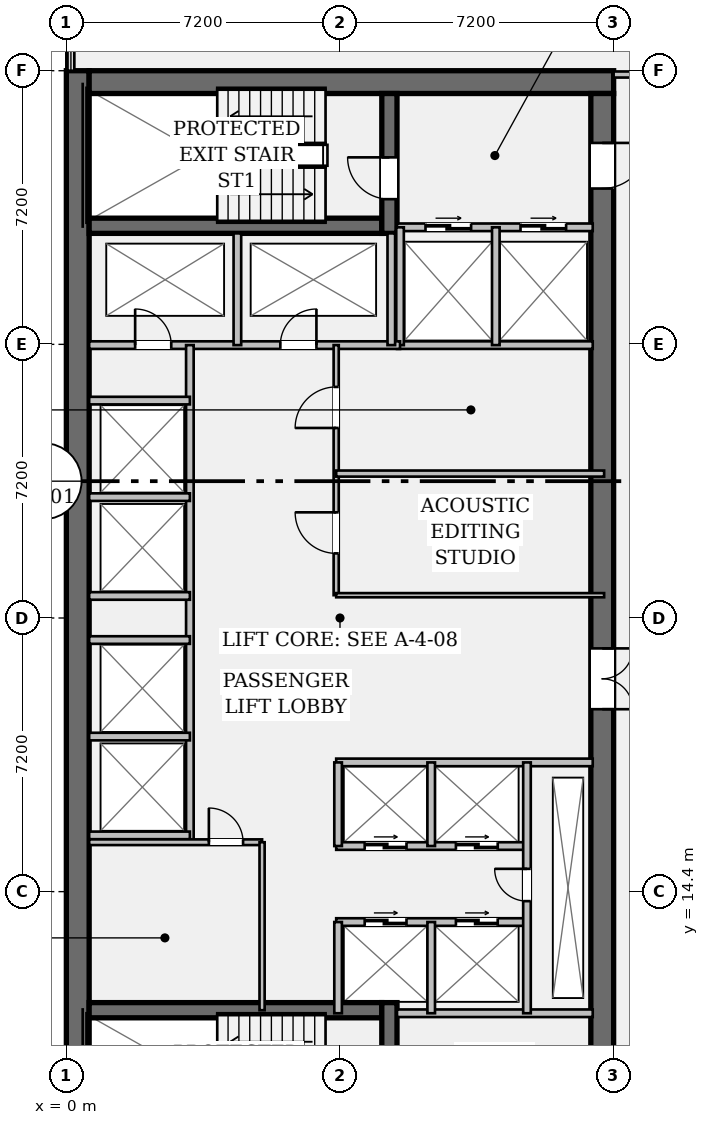
"""IFC4 building model, lengths in metres.
Left out: names, types, materials, properties, quantities, classifications, styles, units other than length and angle.
Written with IfcOpenShell. Run it as: python <this file> out.ifc"""

import sys

from ifc_helpers import new_model, si_unit, direction, frame, frame_2d, origin, place, context, subcontext, project, spatial, rectangle, extrude, element, fill, save


model = new_model("IFC4")
c1 = context("Model", 3, precision=1e-05, world=origin(), true_north=direction((0.0, 1.0)))
c2 = subcontext(c1, "Body", "Model", "MODEL_VIEW")
j1 = project(units=[si_unit("LENGTHUNIT", "METRE"), si_unit("PLANEANGLEUNIT", "RADIAN")], contexts=[c1])
p1 = place(None, origin())
s1 = spatial("IfcSite", under=j1, at=p1, CompositionType="ELEMENT")
p2 = place(p1, origin())
s2 = spatial("IfcBuilding", under=s1, at=p2, CompositionType="ELEMENT")
p3 = place(p2, frame((0.0, 0.0, 117.6)))
s3 = spatial("IfcBuildingStorey", under=s2, at=p3, CompositionType="ELEMENT", Elevation=117.6)
p4 = place(p3, frame((0.3, 7.2, 0.0), z_axis=(0.0, 0.0, 1.0), x_axis=(0.0, 1.0, 0.0)))
e1 = element("IfcWall", 1, at=p4, inside=s3, PredefinedType="SHEAR", context=c2, shape_type="SweptSolid", body=[
    extrude(rectangle(XDim=28.8, YDim=0.6, at=frame_2d((14.4, 0.0))), origin(), (0.0, 0.0, 1.0), 3.58),
])
p5 = place(p3, frame((0.6, 35.7, 0.0), z_axis=(0.0, 0.0, 1.0), x_axis=(1.0, 0.0, 0.0)))
e2 = element("IfcWall", 2, at=p5, inside=s3, PredefinedType="SHEAR", context=c2, shape_type="SweptSolid", body=[
    extrude(rectangle(XDim=13.8, YDim=0.6, at=frame_2d((6.9, 0.0))), origin(), (0.0, 0.0, 1.0), 3.58),
])
p6 = place(p3, frame((14.1, 35.4, 0.0), z_axis=(0.0, 0.0, 1.0), x_axis=(0.0, -1.0, 0.0)))
e3 = element("IfcWall", 3, at=p6, inside=s3, PredefinedType="SHEAR", context=c2, shape_type="SweptSolid", body=[
    extrude(rectangle(XDim=27.6, YDim=0.6, at=frame_2d((13.8, 0.0))), origin(), (0.0, 0.0, 1.0), 3.58),
])
p7 = place(p6, frame((1.3, 0.0, 0.0)))
e4 = element("IfcOpeningElement", 4, at=p7, cuts=e3, PredefinedType="OPENING", context=c2, shape_type="SweptSolid", body=[
    extrude(rectangle(XDim=1.2, YDim=2.15, at=frame_2d((0.6, 1.075))), frame((0.0, 0.312, 0.0), z_axis=(0.0, -1.0, 0.0), x_axis=(1.0, 0.0, 0.0)), (0.0, 0.0, 1.0), 0.624),
])
p8 = place(p6, frame((25.25, 0.0, 0.0)))
e5 = element("IfcOpeningElement", 5, at=p8, cuts=e3, PredefinedType="OPENING", context=c2, shape_type="SweptSolid", body=[
    extrude(rectangle(XDim=1.2, YDim=2.15, at=frame_2d((0.6, 1.075))), frame((0.0, 0.312, 0.0), z_axis=(0.0, -1.0, 0.0), x_axis=(1.0, 0.0, 0.0)), (0.0, 0.0, 1.0), 0.624),
])
p9 = place(p6, frame((14.6, 0.0, 0.0)))
e6 = element("IfcOpeningElement", 6, at=p9, cuts=e3, PredefinedType="OPENING", context=c2, shape_type="SweptSolid", body=[
    extrude(rectangle(XDim=1.6, YDim=2.2, at=frame_2d((0.8, 1.1))), frame((0.0, 0.312, 0.0), z_axis=(0.0, -1.0, 0.0), x_axis=(1.0, 0.0, 0.0)), (0.0, 0.0, 1.0), 0.624),
])
for number, where, z_axis, x_axis in (
    (7, (0.6, 31.92, 0.0), (0.0, 0.0, 1.0), (1.0, 0.0, 0.0)),
    (8, (0.6, 11.28, 0.0), (0.0, 0.0, 1.0), (1.0, 0.0, 0.0)),
):
    element("IfcWall", number, at=place(p3, frame(where, z_axis=z_axis, x_axis=x_axis)), inside=s3, PredefinedType="SHEAR", context=c2, shape_type="SweptSolid", body=[
        extrude(rectangle(XDim=7.7, YDim=0.4, at=frame_2d((3.85, 0.0))), origin(), (0.0, 0.0, 1.0), 3.58),
    ])
p10 = place(p3, frame((8.5, 31.72, 0.0), z_axis=(0.0, 0.0, 1.0), x_axis=(0.0, 1.0, 0.0)))
e9 = element("IfcWall", 9, at=p10, inside=s3, PredefinedType="SHEAR", context=c2, shape_type="SweptSolid", body=[
    extrude(rectangle(XDim=3.68, YDim=0.4, at=frame_2d((1.84, 0.0))), origin(), (0.0, 0.0, 1.0), 3.58),
])
p11 = place(p10, frame((0.9, 0.0, 0.0)))
e10 = element("IfcOpeningElement", 10, at=p11, cuts=e9, PredefinedType="OPENING", context=c2, shape_type="SweptSolid", body=[
    extrude(rectangle(XDim=1.1, YDim=2.15, at=frame_2d((0.55, 1.075))), frame((0.0, 0.212, 0.0), z_axis=(0.0, -1.0, 0.0), x_axis=(1.0, 0.0, 0.0)), (0.0, 0.0, 1.0), 0.424),
])
p12 = place(p3, frame((8.5, 7.8, 0.0), z_axis=(0.0, 0.0, 1.0), x_axis=(0.0, 1.0, 0.0)))
e11 = element("IfcWall", 11, at=p12, inside=s3, PredefinedType="SHEAR", context=c2, shape_type="SweptSolid", body=[
    extrude(rectangle(XDim=3.68, YDim=0.4, at=frame_2d((1.84, 0.0))), origin(), (0.0, 0.0, 1.0), 3.58),
])
p13 = place(p12, frame((0.85, 0.0, 0.0)))
e12 = element("IfcOpeningElement", 12, at=p13, cuts=e11, PredefinedType="OPENING", context=c2, shape_type="SweptSolid", body=[
    extrude(rectangle(XDim=1.1, YDim=2.15, at=frame_2d((0.55, 1.075))), frame((0.0, 0.212, 0.0), z_axis=(0.0, -1.0, 0.0), x_axis=(1.0, 0.0, 0.0)), (0.0, 0.0, 1.0), 0.424),
])
p14 = place(p3, frame((8.7, 31.88, 0.0), z_axis=(0.0, 0.0, 1.0), x_axis=(1.0, 0.0, 0.0)))
e13 = element("IfcWall", 13, at=p14, inside=s3, PredefinedType="PARTITIONING", context=c2, shape_type="SweptSolid", body=[
    extrude(rectangle(XDim=5.15, YDim=0.2, at=frame_2d((2.575, 0.0))), origin(), (0.0, 0.0, 1.0), 3.58),
])
p15 = place(p14, frame((0.75, 0.0, 0.0)))
e14 = element("IfcOpeningElement", 14, at=p15, cuts=e13, PredefinedType="OPENING", context=c2, shape_type="SweptSolid", body=[
    extrude(rectangle(XDim=1.2, YDim=2.2, at=frame_2d((0.6, 1.1))), frame((0.0, 0.112, 0.0), z_axis=(0.0, -1.0, 0.0), x_axis=(1.0, 0.0, 0.0)), (0.0, 0.0, 1.0), 0.224),
])
p16 = place(p14, frame((3.25, 0.0, 0.0)))
e15 = element("IfcOpeningElement", 15, at=p16, cuts=e13, PredefinedType="OPENING", context=c2, shape_type="SweptSolid", body=[
    extrude(rectangle(XDim=1.2, YDim=2.2, at=frame_2d((0.6, 1.1))), frame((0.0, 0.112, 0.0), z_axis=(0.0, -1.0, 0.0), x_axis=(1.0, 0.0, 0.0)), (0.0, 0.0, 1.0), 0.224),
])
for number, where, z_axis, x_axis in (
    (16, (8.7, 11.2, 0.0), (0.0, 0.0, 1.0), (1.0, 0.0, 0.0)),
    (17, (8.7, 28.78, 0.0), (0.0, 0.0, 1.0), (1.0, 0.0, 0.0)),
):
    element("IfcWall", number, at=place(p3, frame(where, z_axis=z_axis, x_axis=x_axis)), inside=s3, PredefinedType="PARTITIONING", context=c2, shape_type="SweptSolid", body=[
        extrude(rectangle(XDim=5.15, YDim=0.2, at=frame_2d((2.575, 0.0))), origin(), (0.0, 0.0, 1.0), 3.58),
    ])
for number, where, z_axis, x_axis in (
    (18, (8.78, 28.78, 0.0), (0.0, 0.0, 1.0), (0.0, 1.0, 0.0)),
    (19, (11.3, 28.78, 0.0), (0.0, 0.0, 1.0), (0.0, 1.0, 0.0)),
):
    element("IfcWall", number, at=place(p3, frame(where, z_axis=z_axis, x_axis=x_axis)), inside=s3, PredefinedType="PARTITIONING", context=c2, shape_type="SweptSolid", body=[
        extrude(rectangle(XDim=3.1, YDim=0.2, at=frame_2d((1.55, 0.0))), origin(), (0.0, 0.0, 1.0), 3.58),
    ])
p17 = place(p3, frame((0.6, 28.78, 0.0), z_axis=(0.0, 0.0, 1.0), x_axis=(1.0, 0.0, 0.0)))
e20 = element("IfcWall", 20, at=p17, inside=s3, PredefinedType="PARTITIONING", context=c2, shape_type="SweptSolid", body=[
    extrude(rectangle(XDim=8.18, YDim=0.2, at=frame_2d((4.09, 0.0))), origin(), (0.0, 0.0, 1.0), 3.58),
])
p18 = place(p17, frame((1.21, 0.0, 0.0)))
e21 = element("IfcOpeningElement", 21, at=p18, cuts=e20, PredefinedType="OPENING", context=c2, shape_type="SweptSolid", body=[
    extrude(rectangle(XDim=0.95, YDim=2.15, at=frame_2d((0.475, 1.075))), frame((0.0, 0.112, 0.0), z_axis=(0.0, -1.0, 0.0), x_axis=(1.0, 0.0, 0.0)), (0.0, 0.0, 1.0), 0.224),
])
p19 = place(p17, frame((5.03, 0.0, 0.0)))
e22 = element("IfcOpeningElement", 22, at=p19, cuts=e20, PredefinedType="OPENING", context=c2, shape_type="SweptSolid", body=[
    extrude(rectangle(XDim=0.95, YDim=2.15, at=frame_2d((0.475, 1.075))), frame((0.0, 0.112, 0.0), z_axis=(0.0, -1.0, 0.0), x_axis=(1.0, 0.0, 0.0)), (0.0, 0.0, 1.0), 0.224),
])
for number, where, z_axis, x_axis in (
    (23, (4.5, 28.78, 0.0), (0.0, 0.0, 1.0), (0.0, 1.0, 0.0)),
    (24, (8.55, 28.78, 0.0), (0.0, 0.0, 1.0), (0.0, 1.0, 0.0)),
):
    element("IfcWall", number, at=place(p3, frame(where, z_axis=z_axis, x_axis=x_axis)), inside=s3, PredefinedType="PARTITIONING", context=c2, shape_type="SweptSolid", body=[
        extrude(rectangle(XDim=2.94, YDim=0.2, at=frame_2d((1.47, 0.0))), origin(), (0.0, 0.0, 1.0), 3.58),
    ])
p20 = place(p3, frame((3.25, 15.7, 0.0), z_axis=(0.0, 0.0, 1.0), x_axis=(0.0, 1.0, 0.0)))
e25 = element("IfcWall", 25, at=p20, inside=s3, PredefinedType="PARTITIONING", context=c2, shape_type="SweptSolid", body=[
    extrude(rectangle(XDim=13.08, YDim=0.2, at=frame_2d((6.54, 0.0))), origin(), (0.0, 0.0, 1.0), 3.58),
])
for number, where, z_axis, x_axis in (
    (26, (0.6, 15.88, 0.0), (0.0, 0.0, 1.0), (1.0, 0.0, 0.0)),
    (27, (0.6, 18.48, 0.0), (0.0, 0.0, 1.0), (1.0, 0.0, 0.0)),
    (28, (0.6, 22.18, 0.0), (0.0, 0.0, 1.0), (1.0, 0.0, 0.0)),
    (29, (0.6, 24.78, 0.0), (0.0, 0.0, 1.0), (1.0, 0.0, 0.0)),
    (30, (0.6, 21.02, 0.0), (0.0, 0.0, 1.0), (1.0, 0.0, 0.0)),
    (31, (0.6, 27.32, 0.0), (0.0, 0.0, 1.0), (1.0, 0.0, 0.0)),
):
    element("IfcWall", number, at=place(p3, frame(where, z_axis=z_axis, x_axis=x_axis)), inside=s3, PredefinedType="PARTITIONING", context=c2, shape_type="SweptSolid", body=[
        extrude(rectangle(XDim=2.65, YDim=0.2, at=frame_2d((1.325, 0.0))), origin(), (0.0, 0.0, 1.0), 3.58),
    ])
p21 = place(p3, frame((7.1, 22.2, 0.0), z_axis=(0.0, 0.0, 1.0), x_axis=(0.0, 1.0, 0.0)))
e32 = element("IfcWall", 32, at=p21, inside=s3, PredefinedType="PARTITIONING", context=c2, shape_type="SweptSolid", body=[
    extrude(rectangle(XDim=6.58, YDim=0.135, at=frame_2d((3.29, 0.0))), origin(), (0.0, 0.0, 1.0), 3.58),
])
p22 = place(p21, frame((1.1, 0.0, 0.0)))
e33 = element("IfcOpeningElement", 33, at=p22, cuts=e32, PredefinedType="OPENING", context=c2, shape_type="SweptSolid", body=[
    extrude(rectangle(XDim=1.08, YDim=2.15, at=frame_2d((0.54, 1.075))), frame((0.0, 0.08, 0.0), z_axis=(0.0, -1.0, 0.0), x_axis=(1.0, 0.0, 0.0)), (0.0, 0.0, 1.0), 0.159),
])
p23 = place(p21, frame((4.4, 0.0, 0.0)))
e34 = element("IfcOpeningElement", 34, at=p23, cuts=e32, PredefinedType="OPENING", context=c2, shape_type="SweptSolid", body=[
    extrude(rectangle(XDim=1.08, YDim=2.15, at=frame_2d((0.54, 1.075))), frame((0.0, 0.08, 0.0), z_axis=(0.0, -1.0, 0.0), x_axis=(1.0, 0.0, 0.0)), (0.0, 0.0, 1.0), 0.159),
])
p24 = place(p3, frame((7.1, 22.2, 0.0), z_axis=(0.0, 0.0, 1.0), x_axis=(1.0, 0.0, 0.0)))
e35 = element("IfcWall", 35, at=p24, inside=s3, PredefinedType="PARTITIONING", context=c2, shape_type="SweptSolid", body=[
    extrude(rectangle(XDim=7.05, YDim=0.11, at=frame_2d((3.525, 0.0))), origin(), (0.0, 0.0, 1.0), 3.58),
])
p25 = place(p3, frame((7.1, 25.4, 0.0), z_axis=(0.0, 0.0, 1.0), x_axis=(1.0, 0.0, 0.0)))
e36 = element("IfcWall", 36, at=p25, inside=s3, PredefinedType="PARTITIONING", context=c2, shape_type="SweptSolid", body=[
    extrude(rectangle(XDim=7.05, YDim=0.16, at=frame_2d((3.525, 0.0))), origin(), (0.0, 0.0, 1.0), 3.58),
])
p26 = place(p3, frame((7.1, 17.8, 0.0), z_axis=(0.0, 0.0, 1.0), x_axis=(1.0, 0.0, 0.0)))
e37 = element("IfcWall", 37, at=p26, inside=s3, PredefinedType="PARTITIONING", context=c2, shape_type="SweptSolid", body=[
    extrude(rectangle(XDim=6.75, YDim=0.2, at=frame_2d((3.375, 0.0))), origin(), (0.0, 0.0, 1.0), 3.58),
])
p27 = place(p3, frame((7.1, 15.6, 0.0), z_axis=(0.0, 0.0, 1.0), x_axis=(1.0, 0.0, 0.0)))
e38 = element("IfcWall", 38, at=p27, inside=s3, PredefinedType="PARTITIONING", context=c2, shape_type="SweptSolid", body=[
    extrude(rectangle(XDim=5.02, YDim=0.2, at=frame_2d((2.51, 0.0))), origin(), (0.0, 0.0, 1.0), 3.58),
])
p28 = place(p27, frame((0.75, 0.0, 0.0)))
e39 = element("IfcOpeningElement", 39, at=p28, cuts=e38, PredefinedType="OPENING", context=c2, shape_type="SweptSolid", body=[
    extrude(rectangle(XDim=1.1, YDim=2.2, at=frame_2d((0.55, 1.1))), frame((0.0, 0.112, 0.0), z_axis=(0.0, -1.0, 0.0), x_axis=(1.0, 0.0, 0.0)), (0.0, 0.0, 1.0), 0.224),
])
p29 = place(p27, frame((3.15, 0.0, 0.0)))
e40 = element("IfcOpeningElement", 40, at=p29, cuts=e38, PredefinedType="OPENING", context=c2, shape_type="SweptSolid", body=[
    extrude(rectangle(XDim=1.1, YDim=2.2, at=frame_2d((0.55, 1.1))), frame((0.0, 0.112, 0.0), z_axis=(0.0, -1.0, 0.0), x_axis=(1.0, 0.0, 0.0)), (0.0, 0.0, 1.0), 0.224),
])
p30 = place(p3, frame((7.1, 13.6, 0.0), z_axis=(0.0, 0.0, 1.0), x_axis=(1.0, 0.0, 0.0)))
e41 = element("IfcWall", 41, at=p30, inside=s3, PredefinedType="PARTITIONING", context=c2, shape_type="SweptSolid", body=[
    extrude(rectangle(XDim=5.02, YDim=0.2, at=frame_2d((2.51, 0.0))), origin(), (0.0, 0.0, 1.0), 3.58),
])
p31 = place(p30, frame((0.75, 0.0, 0.0)))
e42 = element("IfcOpeningElement", 42, at=p31, cuts=e41, PredefinedType="OPENING", context=c2, shape_type="SweptSolid", body=[
    extrude(rectangle(XDim=1.1, YDim=2.2, at=frame_2d((0.55, 1.1))), frame((0.0, 0.112, 0.0), z_axis=(0.0, -1.0, 0.0), x_axis=(1.0, 0.0, 0.0)), (0.0, 0.0, 1.0), 0.224),
])
p32 = place(p30, frame((3.15, 0.0, 0.0)))
e43 = element("IfcOpeningElement", 43, at=p32, cuts=e41, PredefinedType="OPENING", context=c2, shape_type="SweptSolid", body=[
    extrude(rectangle(XDim=1.1, YDim=2.2, at=frame_2d((0.55, 1.1))), frame((0.0, 0.112, 0.0), z_axis=(0.0, -1.0, 0.0), x_axis=(1.0, 0.0, 0.0)), (0.0, 0.0, 1.0), 0.224),
])
p33 = place(p3, frame((7.15, 15.6, 0.0), z_axis=(0.0, 0.0, 1.0), x_axis=(0.0, 1.0, 0.0)))
e44 = element("IfcWall", 44, at=p33, inside=s3, PredefinedType="PARTITIONING", context=c2, shape_type="SweptSolid", body=[
    extrude(rectangle(XDim=2.2, YDim=0.2, at=frame_2d((1.1, 0.0))), origin(), (0.0, 0.0, 1.0), 3.58),
])
p34 = place(p3, frame((7.15, 11.2, 0.0), z_axis=(0.0, 0.0, 1.0), x_axis=(0.0, 1.0, 0.0)))
e45 = element("IfcWall", 45, at=p34, inside=s3, PredefinedType="PARTITIONING", context=c2, shape_type="SweptSolid", body=[
    extrude(rectangle(XDim=2.4, YDim=0.2, at=frame_2d((1.2, 0.0))), origin(), (0.0, 0.0, 1.0), 3.58),
])
p35 = place(p3, frame((9.6, 15.6, 0.0), z_axis=(0.0, 0.0, 1.0), x_axis=(0.0, 1.0, 0.0)))
e46 = element("IfcWall", 46, at=p35, inside=s3, PredefinedType="PARTITIONING", context=c2, shape_type="SweptSolid", body=[
    extrude(rectangle(XDim=2.2, YDim=0.2, at=frame_2d((1.1, 0.0))), origin(), (0.0, 0.0, 1.0), 3.58),
])
p36 = place(p3, frame((9.6, 11.2, 0.0), z_axis=(0.0, 0.0, 1.0), x_axis=(0.0, 1.0, 0.0)))
e47 = element("IfcWall", 47, at=p36, inside=s3, PredefinedType="PARTITIONING", context=c2, shape_type="SweptSolid", body=[
    extrude(rectangle(XDim=2.4, YDim=0.2, at=frame_2d((1.2, 0.0))), origin(), (0.0, 0.0, 1.0), 3.58),
])
p37 = place(p3, frame((12.12, 11.2, 0.0), z_axis=(0.0, 0.0, 1.0), x_axis=(0.0, 1.0, 0.0)))
e48 = element("IfcWall", 48, at=p37, inside=s3, PredefinedType="PARTITIONING", context=c2, shape_type="SweptSolid", body=[
    extrude(rectangle(XDim=6.6, YDim=0.2, at=frame_2d((3.3, 0.0))), origin(), (0.0, 0.0, 1.0), 3.58),
])
p38 = place(p37, frame((2.95, 0.0, 0.0)))
e49 = element("IfcOpeningElement", 49, at=p38, cuts=e48, PredefinedType="OPENING", context=c2, shape_type="SweptSolid", body=[
    extrude(rectangle(XDim=0.85, YDim=2.15, at=frame_2d((0.425, 1.075))), frame((0.0, 0.112, 0.0), z_axis=(0.0, -1.0, 0.0), x_axis=(1.0, 0.0, 0.0)), (0.0, 0.0, 1.0), 0.224),
])
p39 = place(p3, frame((0.6, 15.7, 0.0), z_axis=(0.0, 0.0, 1.0), x_axis=(1.0, 0.0, 0.0)))
e50 = element("IfcWall", 50, at=p39, inside=s3, PredefinedType="PARTITIONING", context=c2, shape_type="SweptSolid", body=[
    extrude(rectangle(XDim=4.55, YDim=0.15, at=frame_2d((2.275, 0.0))), origin(), (0.0, 0.0, 1.0), 3.58),
])
p40 = place(p39, frame((3.15, 0.0, 0.0)))
e51 = element("IfcOpeningElement", 51, at=p40, cuts=e50, PredefinedType="OPENING", context=c2, shape_type="SweptSolid", body=[
    extrude(rectangle(XDim=0.9, YDim=2.15, at=frame_2d((0.45, 1.075))), frame((0.0, 0.087, 0.0), z_axis=(0.0, -1.0, 0.0), x_axis=(1.0, 0.0, 0.0)), (0.0, 0.0, 1.0), 0.174),
])
p41 = place(p3, frame((5.15, 11.28, 0.0), z_axis=(0.0, 0.0, 1.0), x_axis=(0.0, 1.0, 0.0)))
e52 = element("IfcWall", 52, at=p41, inside=s3, PredefinedType="PARTITIONING", context=c2, shape_type="SweptSolid", body=[
    extrude(rectangle(XDim=4.42, YDim=0.135, at=frame_2d((2.21, 0.0))), origin(), (0.0, 0.0, 1.0), 3.58),
])
p42 = place(p3, frame((14.4, 35.9, 0.0), z_axis=(0.0, 0.0, 1.0), x_axis=(1.0, 0.0, 0.0)))
e53 = element("IfcWall", 53, at=p42, inside=s3, PredefinedType="PARTITIONING", context=c2, shape_type="SweptSolid", body=[
    extrude(rectangle(XDim=2.95, YDim=0.16, at=frame_2d((1.475, 0.0))), origin(), (0.0, 0.0, 1.0), 2.869),
])
p43 = place(p42, frame((0.95, 0.0, 0.0)))
e54 = element("IfcOpeningElement", 54, at=p43, cuts=e53, PredefinedType="OPENING", context=c2, shape_type="SweptSolid", body=[
    extrude(rectangle(XDim=1.0, YDim=2.15, at=frame_2d((0.5, 1.075))), frame((0.0, 0.092, 0.0), z_axis=(0.0, -1.0, 0.0), x_axis=(1.0, 0.0, 0.0)), (0.0, 0.0, 1.0), 0.184),
])
p44 = place(p11, origin())
e55 = element("IfcDoor", 55, at=p44, inside=s3, OperationType="SINGLE_SWING_RIGHT", PredefinedType="DOOR", context=c2, shape_type="SweptSolid", body=[
    extrude(rectangle(XDim=1.1, YDim=2.15, at=frame_2d((0.55, 1.075))), frame((0.0, 0.025, 0.0), z_axis=(0.0, -1.0, 0.0), x_axis=(1.0, 0.0, 0.0)), (0.0, 0.0, 1.0), 0.05),
])
fill(e10, e55)
p45 = place(p7, origin())
e56 = element("IfcDoor", 56, at=p45, inside=s3, OperationType="SINGLE_SWING_LEFT", PredefinedType="DOOR", context=c2, shape_type="SweptSolid", body=[
    extrude(rectangle(XDim=1.2, YDim=2.15, at=frame_2d((0.6, 1.075))), frame((0.0, 0.025, 0.0), z_axis=(0.0, -1.0, 0.0), x_axis=(1.0, 0.0, 0.0)), (0.0, 0.0, 1.0), 0.05),
])
fill(e4, e56)
p46 = place(p15, origin())
e57 = element("IfcDoor", 57, at=p46, inside=s3, OperationType="DOUBLE_DOOR_SLIDING", PredefinedType="DOOR", context=c2, shape_type="SweptSolid", body=[
    extrude(rectangle(XDim=1.2, YDim=2.2, at=frame_2d((0.6, 1.1))), frame((0.0, 0.025, 0.0), z_axis=(0.0, -1.0, 0.0), x_axis=(1.0, 0.0, 0.0)), (0.0, 0.0, 1.0), 0.05),
])
fill(e14, e57)
p47 = place(p16, origin())
e58 = element("IfcDoor", 58, at=p47, inside=s3, OperationType="DOUBLE_DOOR_SLIDING", PredefinedType="DOOR", context=c2, shape_type="SweptSolid", body=[
    extrude(rectangle(XDim=1.2, YDim=2.2, at=frame_2d((0.6, 1.1))), frame((0.0, 0.025, 0.0), z_axis=(0.0, -1.0, 0.0), x_axis=(1.0, 0.0, 0.0)), (0.0, 0.0, 1.0), 0.05),
])
fill(e15, e58)
p48 = place(p18, origin())
e59 = element("IfcDoor", 59, at=p48, inside=s3, OperationType="SINGLE_SWING_LEFT", PredefinedType="DOOR", context=c2, shape_type="SweptSolid", body=[
    extrude(rectangle(XDim=0.95, YDim=2.15, at=frame_2d((0.475, 1.075))), frame((0.0, 0.025, 0.0), z_axis=(0.0, -1.0, 0.0), x_axis=(1.0, 0.0, 0.0)), (0.0, 0.0, 1.0), 0.05),
])
fill(e21, e59)
p49 = place(p19, origin())
e60 = element("IfcDoor", 60, at=p49, inside=s3, OperationType="SINGLE_SWING_RIGHT", PredefinedType="DOOR", context=c2, shape_type="SweptSolid", body=[
    extrude(rectangle(XDim=0.95, YDim=2.15, at=frame_2d((0.475, 1.075))), frame((0.0, 0.025, 0.0), z_axis=(0.0, -1.0, 0.0), x_axis=(1.0, 0.0, 0.0)), (0.0, 0.0, 1.0), 0.05),
])
fill(e22, e60)
p50 = place(p9, origin())
e61 = element("IfcDoor", 61, at=p50, inside=s3, OperationType="DOUBLE_DOOR_SINGLE_SWING", PredefinedType="DOOR", context=c2, shape_type="SweptSolid", body=[
    extrude(rectangle(XDim=1.6, YDim=2.2, at=frame_2d((0.8, 1.1))), frame((0.0, 0.025, 0.0), z_axis=(0.0, -1.0, 0.0), x_axis=(1.0, 0.0, 0.0)), (0.0, 0.0, 1.0), 0.05),
])
fill(e6, e61)
p51 = place(p22, origin())
e62 = element("IfcDoor", 62, at=p51, inside=s3, OperationType="SINGLE_SWING_RIGHT", PredefinedType="DOOR", context=c2, shape_type="SweptSolid", body=[
    extrude(rectangle(XDim=1.08, YDim=2.15, at=frame_2d((0.54, 1.075))), frame((0.0, 0.025, 0.0), z_axis=(0.0, -1.0, 0.0), x_axis=(1.0, 0.0, 0.0)), (0.0, 0.0, 1.0), 0.05),
])
fill(e33, e62)
p52 = place(p23, origin())
e63 = element("IfcDoor", 63, at=p52, inside=s3, OperationType="SINGLE_SWING_LEFT", PredefinedType="DOOR", context=c2, shape_type="SweptSolid", body=[
    extrude(rectangle(XDim=1.08, YDim=2.15, at=frame_2d((0.54, 1.075))), frame((0.0, 0.025, 0.0), z_axis=(0.0, -1.0, 0.0), x_axis=(1.0, 0.0, 0.0)), (0.0, 0.0, 1.0), 0.05),
])
fill(e34, e63)
p53 = place(p38, origin())
e64 = element("IfcDoor", 64, at=p53, inside=s3, OperationType="SINGLE_SWING_RIGHT", PredefinedType="DOOR", context=c2, shape_type="SweptSolid", body=[
    extrude(rectangle(XDim=0.85, YDim=2.15, at=frame_2d((0.425, 1.075))), frame((0.0, 0.025, 0.0), z_axis=(0.0, -1.0, 0.0), x_axis=(1.0, 0.0, 0.0)), (0.0, 0.0, 1.0), 0.05),
])
fill(e49, e64)
p54 = place(p28, origin())
e65 = element("IfcDoor", 65, at=p54, inside=s3, OperationType="DOUBLE_DOOR_SLIDING", PredefinedType="DOOR", context=c2, shape_type="SweptSolid", body=[
    extrude(rectangle(XDim=1.1, YDim=2.2, at=frame_2d((0.55, 1.1))), frame((0.0, 0.025, 0.0), z_axis=(0.0, -1.0, 0.0), x_axis=(1.0, 0.0, 0.0)), (0.0, 0.0, 1.0), 0.05),
])
fill(e39, e65)
p55 = place(p29, origin())
e66 = element("IfcDoor", 66, at=p55, inside=s3, OperationType="DOUBLE_DOOR_SLIDING", PredefinedType="DOOR", context=c2, shape_type="SweptSolid", body=[
    extrude(rectangle(XDim=1.1, YDim=2.2, at=frame_2d((0.55, 1.1))), frame((0.0, 0.025, 0.0), z_axis=(0.0, -1.0, 0.0), x_axis=(1.0, 0.0, 0.0)), (0.0, 0.0, 1.0), 0.05),
])
fill(e40, e66)
p56 = place(p31, origin())
e67 = element("IfcDoor", 67, at=p56, inside=s3, OperationType="DOUBLE_DOOR_SLIDING", PredefinedType="DOOR", context=c2, shape_type="SweptSolid", body=[
    extrude(rectangle(XDim=1.1, YDim=2.2, at=frame_2d((0.55, 1.1))), frame((0.0, 0.025, 0.0), z_axis=(0.0, -1.0, 0.0), x_axis=(1.0, 0.0, 0.0)), (0.0, 0.0, 1.0), 0.05),
])
fill(e42, e67)
p57 = place(p32, origin())
e68 = element("IfcDoor", 68, at=p57, inside=s3, OperationType="DOUBLE_DOOR_SLIDING", PredefinedType="DOOR", context=c2, shape_type="SweptSolid", body=[
    extrude(rectangle(XDim=1.1, YDim=2.2, at=frame_2d((0.55, 1.1))), frame((0.0, 0.025, 0.0), z_axis=(0.0, -1.0, 0.0), x_axis=(1.0, 0.0, 0.0)), (0.0, 0.0, 1.0), 0.05),
])
fill(e43, e68)
p58 = place(p40, origin())
e69 = element("IfcDoor", 69, at=p58, inside=s3, OperationType="SINGLE_SWING_LEFT", PredefinedType="DOOR", context=c2, shape_type="SweptSolid", body=[
    extrude(rectangle(XDim=0.9, YDim=2.15, at=frame_2d((0.45, 1.075))), frame((0.0, 0.025, 0.0), z_axis=(0.0, -1.0, 0.0), x_axis=(1.0, 0.0, 0.0)), (0.0, 0.0, 1.0), 0.05),
])
fill(e51, e69)
save(model, sys.argv[1])
